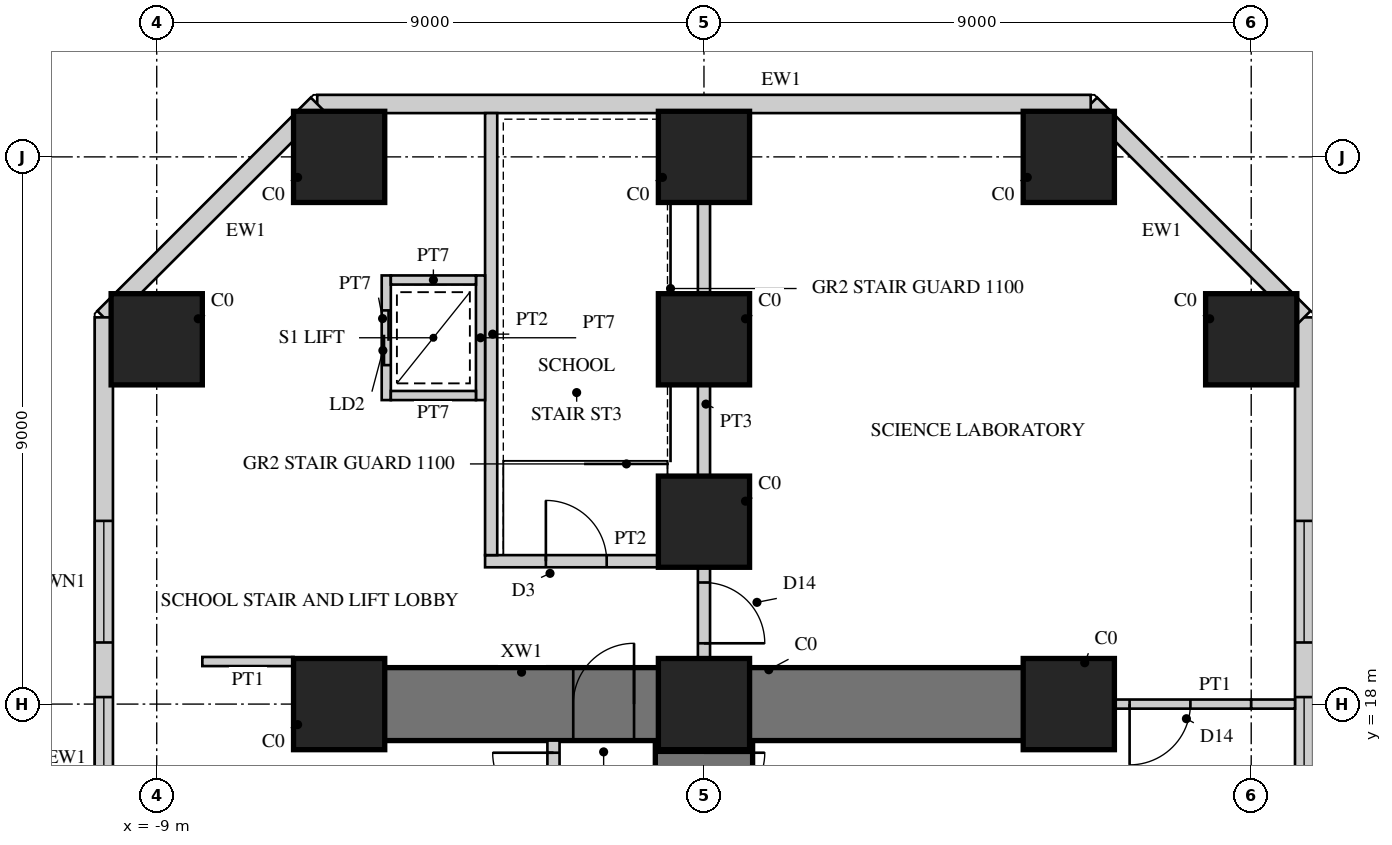
"""IFC4 building model, lengths in metres.
Left out: names, types, materials, properties, quantities, classifications, styles, units other than length and angle.
Written with IfcOpenShell. Run it as: python <this file> out.ifc"""

import sys

from ifc_helpers import new_model, si_unit, direction, frame, frame_2d, origin, origin_2d, place, context, subcontext, project, spatial, rectangle, hollow_rectangle, extrude, element, fill, save


model = new_model("IFC4")
c1 = context("Model", 3, precision=1e-05, world=origin(), true_north=direction((0.0, 1.0)))
c2 = subcontext(c1, "Body", "Model", "MODEL_VIEW")
j1 = project(units=[si_unit("LENGTHUNIT", "METRE"), si_unit("PLANEANGLEUNIT", "RADIAN")], contexts=[c1])
p1 = place(None, origin())
s1 = spatial("IfcSite", under=j1, at=p1, CompositionType="ELEMENT")
p2 = place(p1, origin())
s2 = spatial("IfcBuilding", under=s1, at=p2, CompositionType="ELEMENT")
p3 = place(p2, frame((0.0, 0.0, 14.0)))
s3 = spatial("IfcBuildingStorey", under=s2, at=p3, CompositionType="ELEMENT", Elevation=14.0)
p4 = place(p3, frame((0.0, 9.0, 0.0), z_axis=(0.0, 0.0, 1.0), x_axis=(0.0, 1.0, 0.0)))
e1 = element("IfcWall", 1, at=p4, inside=s3, PredefinedType="SHEAR", context=c2, shape_type="SweptSolid", body=[
    extrude(rectangle(XDim=9.0, YDim=1.6, at=frame_2d((4.5, 0.0))), origin(), (0.0, 0.0, 1.0), 4.5),
])
p5 = place(p4, frame((1.85, 0.0, 0.0)))
e2 = element("IfcOpeningElement", 2, at=p5, cuts=e1, PredefinedType="OPENING", context=c2, shape_type="SweptSolid", body=[
    extrude(rectangle(XDim=1.0, YDim=2.2, at=frame_2d((0.5, 1.1))), frame((0.0, 0.81, 0.0), z_axis=(0.0, -1.0, 0.0), x_axis=(1.0, 0.0, 0.0)), (0.0, 0.0, 1.0), 1.62),
])
p6 = place(p4, frame((7.2, 0.0, 0.0)))
e3 = element("IfcOpeningElement", 3, at=p6, cuts=e1, PredefinedType="OPENING", context=c2, shape_type="SweptSolid", body=[
    extrude(rectangle(XDim=1.0, YDim=2.2, at=frame_2d((0.5, 1.1))), frame((0.0, 0.81, 0.0), z_axis=(0.0, -1.0, 0.0), x_axis=(1.0, 0.0, 0.0)), (0.0, 0.0, 1.0), 1.62),
])
p7 = place(p3, frame((0.0, 18.0, 0.0), z_axis=(0.0, 0.0, 1.0), x_axis=(-1.0, 0.0, 0.0)))
e4 = element("IfcWall", 4, at=p7, inside=s3, PredefinedType="SHEAR", context=c2, shape_type="SweptSolid", body=[
    extrude(rectangle(XDim=6.0, YDim=1.2, at=frame_2d((3.0, 0.0))), origin(), (0.0, 0.0, 1.0), 4.5),
])
p8 = place(p7, frame((1.15, 0.0, 0.0)))
e5 = element("IfcOpeningElement", 5, at=p8, cuts=e4, PredefinedType="OPENING", context=c2, shape_type="SweptSolid", body=[
    extrude(rectangle(XDim=1.0, YDim=2.2, at=frame_2d((0.5, 1.1))), frame((0.0, 0.61, 0.0), z_axis=(0.0, -1.0, 0.0), x_axis=(1.0, 0.0, 0.0)), (0.0, 0.0, 1.0), 1.22),
])
p9 = place(p3, frame((0.0, 18.0, 0.0), z_axis=(0.0, 0.0, 1.0), x_axis=(1.0, 0.0, 0.0)))
e6 = element("IfcWall", 6, at=p9, inside=s3, PredefinedType="SHEAR", context=c2, shape_type="SweptSolid", body=[
    extrude(rectangle(XDim=6.0, YDim=1.2, at=frame_2d((3.0, 0.0))), origin(), (0.0, 0.0, 1.0), 4.5),
])
for number, where, z_axis, x_axis in (
    (7, (9.0, 24.0, 0.0), (0.0, 0.0, 1.0), (1.0, 0.0, 0.0)),
    (8, (-9.0, 24.0, 0.0), (0.0, 0.0, 1.0), (1.0, 0.0, 0.0)),
    (9, (6.0, 27.0, 0.0), (0.0, 0.0, 1.0), (1.0, 0.0, 0.0)),
    (10, (0.0, 27.0, 0.0), (0.0, 0.0, 1.0), (1.0, 0.0, 0.0)),
    (11, (-6.0, 27.0, 0.0), (0.0, 0.0, 1.0), (1.0, 0.0, 0.0)),
    (12, (6.0, 18.0, 0.0), (0.0, 0.0, 1.0), (1.0, 0.0, 0.0)),
    (13, (0.0, 18.0, 0.0), (0.0, 0.0, 1.0), (1.0, 0.0, 0.0)),
    (14, (-6.0, 18.0, 0.0), (0.0, 0.0, 1.0), (1.0, 0.0, 0.0)),
    (15, (0.0, 21.0, 0.0), (0.0, 0.0, 1.0), (1.0, 0.0, 0.0)),
    (16, (0.0, 24.0, 0.0), (0.0, 0.0, 1.0), (1.0, 0.0, 0.0)),
):
    element("IfcColumn", number, at=place(p3, frame(where, z_axis=z_axis, x_axis=x_axis)), inside=s3, PredefinedType="COLUMN", context=c2, shape_type="SweptSolid", body=[
        extrude(rectangle(XDim=1.5, YDim=1.5, at=origin_2d()), origin(), (0.0, 0.0, 1.0), 4.5),
    ])
p10 = place(p3, frame((9.87, 9.87, 0.0), z_axis=(0.0, 0.0, 1.0), x_axis=(0.0, 1.0, 0.0)))
e17 = element("IfcWall", 17, at=p10, inside=s3, PredefinedType="SOLIDWALL", context=c2, shape_type="SweptSolid", body=[
    extrude(rectangle(XDim=14.49, YDim=0.3, at=frame_2d((7.245, 0.0))), origin(), (0.0, 0.0, 1.0), 4.25),
])
p11 = place(p10, frame((6.245, 0.0, 0.9)))
e18 = element("IfcOpeningElement", 18, at=p11, cuts=e17, PredefinedType="OPENING", context=c2, shape_type="SweptSolid", body=[
    extrude(rectangle(XDim=2.0, YDim=1.8, at=frame_2d((1.0, 0.9))), frame((0.0, 0.16, 0.0), z_axis=(0.0, -1.0, 0.0), x_axis=(1.0, 0.0, 0.0)), (0.0, 0.0, 1.0), 0.32),
])
p12 = place(p10, frame((9.143, 0.0, 0.9)))
e19 = element("IfcOpeningElement", 19, at=p12, cuts=e17, PredefinedType="OPENING", context=c2, shape_type="SweptSolid", body=[
    extrude(rectangle(XDim=2.0, YDim=1.8, at=frame_2d((1.0, 0.9))), frame((0.0, 0.16, 0.0), z_axis=(0.0, -1.0, 0.0), x_axis=(1.0, 0.0, 0.0)), (0.0, 0.0, 1.0), 0.32),
])
p13 = place(p3, frame((9.87, 24.36, 0.0), z_axis=(0.0, 0.0, 1.0), x_axis=(-0.707106781187, 0.707106781187, 0.0)))
e20 = element("IfcWall", 20, at=p13, inside=s3, PredefinedType="SOLIDWALL", context=c2, shape_type="SweptSolid", body=[
    extrude(rectangle(XDim=4.964, YDim=0.3, at=frame_2d((2.482, 0.0))), origin(), (0.0, 0.0, 1.0), 4.25),
])
p14 = place(p3, frame((6.36, 27.87, 0.0), z_axis=(0.0, 0.0, 1.0), x_axis=(-1.0, 0.0, 0.0)))
e21 = element("IfcWall", 21, at=p14, inside=s3, PredefinedType="SOLIDWALL", context=c2, shape_type="SweptSolid", body=[
    extrude(rectangle(XDim=12.721, YDim=0.3, at=frame_2d((6.36, 0.0))), origin(), (0.0, 0.0, 1.0), 4.25),
])
p15 = place(p3, frame((-6.36, 27.87, 0.0), z_axis=(0.0, 0.0, 1.0), x_axis=(-0.707106781187, -0.707106781187, 0.0)))
e22 = element("IfcWall", 22, at=p15, inside=s3, PredefinedType="SOLIDWALL", context=c2, shape_type="SweptSolid", body=[
    extrude(rectangle(XDim=4.964, YDim=0.3, at=frame_2d((2.482, 0.0))), origin(), (0.0, 0.0, 1.0), 4.25),
])
p16 = place(p3, frame((-9.87, 24.36, 0.0), z_axis=(0.0, 0.0, 1.0), x_axis=(0.0, -1.0, 0.0)))
e23 = element("IfcWall", 23, at=p16, inside=s3, PredefinedType="SOLIDWALL", context=c2, shape_type="SweptSolid", body=[
    extrude(rectangle(XDim=14.49, YDim=0.3, at=frame_2d((7.245, 0.0))), origin(), (0.0, 0.0, 1.0), 4.25),
])
p17 = place(p16, frame((3.347, 0.0, 0.9)))
e24 = element("IfcOpeningElement", 24, at=p17, cuts=e23, PredefinedType="OPENING", context=c2, shape_type="SweptSolid", body=[
    extrude(rectangle(XDim=2.0, YDim=1.8, at=frame_2d((1.0, 0.9))), frame((0.0, 0.16, 0.0), z_axis=(0.0, -1.0, 0.0), x_axis=(1.0, 0.0, 0.0)), (0.0, 0.0, 1.0), 0.32),
])
p18 = place(p16, frame((6.245, 0.0, 0.9)))
e25 = element("IfcOpeningElement", 25, at=p18, cuts=e23, PredefinedType="OPENING", context=c2, shape_type="SweptSolid", body=[
    extrude(rectangle(XDim=2.0, YDim=1.8, at=frame_2d((1.0, 0.9))), frame((0.0, 0.16, 0.0), z_axis=(0.0, -1.0, 0.0), x_axis=(1.0, 0.0, 0.0)), (0.0, 0.0, 1.0), 0.32),
])
p19 = place(p3, frame((-2.475, 9.65, 0.0), z_axis=(0.0, 0.0, 1.0), x_axis=(0.0, 1.0, 0.0)))
e26 = element("IfcWall", 26, at=p19, inside=s3, PredefinedType="SOLIDWALL", context=c2, shape_type="SweptSolid", body=[
    extrude(rectangle(XDim=7.75, YDim=0.2, at=frame_2d((3.875, 0.0))), origin(), (0.0, 0.0, 1.0), 4.25),
])
p20 = place(p19, frame((1.2, 0.0, 0.0)))
e27 = element("IfcOpeningElement", 27, at=p20, cuts=e26, PredefinedType="OPENING", context=c2, shape_type="SweptSolid", body=[
    extrude(rectangle(XDim=1.0, YDim=2.2, at=frame_2d((0.5, 1.1))), frame((0.0, 0.11, 0.0), z_axis=(0.0, -1.0, 0.0), x_axis=(1.0, 0.0, 0.0)), (0.0, 0.0, 1.0), 0.22),
])
p21 = place(p19, frame((3.6, 0.0, 0.0)))
e28 = element("IfcOpeningElement", 28, at=p21, cuts=e26, PredefinedType="OPENING", context=c2, shape_type="SweptSolid", body=[
    extrude(rectangle(XDim=1.0, YDim=2.2, at=frame_2d((0.5, 1.1))), frame((0.0, 0.11, 0.0), z_axis=(0.0, -1.0, 0.0), x_axis=(1.0, 0.0, 0.0)), (0.0, 0.0, 1.0), 0.22),
])
p22 = place(p19, frame((6.55, 0.0, 0.0)))
e29 = element("IfcOpeningElement", 29, at=p22, cuts=e26, PredefinedType="OPENING", context=c2, shape_type="SweptSolid", body=[
    extrude(rectangle(XDim=1.0, YDim=2.2, at=frame_2d((0.5, 1.1))), frame((0.0, 0.11, 0.0), z_axis=(0.0, -1.0, 0.0), x_axis=(1.0, 0.0, 0.0)), (0.0, 0.0, 1.0), 0.22),
])
p23 = place(p3, frame((-6.75, 18.7, 0.0), z_axis=(0.0, 0.0, 1.0), x_axis=(-1.0, 0.0, 0.0)))
e30 = element("IfcWall", 30, at=p23, inside=s3, PredefinedType="PARTITIONING", context=c2, shape_type="SweptSolid", body=[
    extrude(rectangle(XDim=1.5, YDim=0.15, at=frame_2d((0.75, 0.0))), origin(), (0.0, 0.0, 1.0), 4.25),
])
p24 = place(p3, frame((-0.1, 20.35, 0.0), z_axis=(0.0, 0.0, 1.0), x_axis=(-1.0, 0.0, 0.0)))
e31 = element("IfcWall", 31, at=p24, inside=s3, PredefinedType="SOLIDWALL", context=c2, shape_type="SweptSolid", body=[
    extrude(rectangle(XDim=3.5, YDim=0.2, at=frame_2d((1.75, 0.0))), origin(), (0.0, 0.0, 1.0), 4.25),
])
p25 = place(p24, frame((1.5, 0.0, 0.0)))
e32 = element("IfcOpeningElement", 32, at=p25, cuts=e31, PredefinedType="OPENING", context=c2, shape_type="SweptSolid", body=[
    extrude(rectangle(XDim=1.0, YDim=2.1, at=frame_2d((0.5, 1.05))), frame((0.0, 0.11, 0.0), z_axis=(0.0, -1.0, 0.0), x_axis=(1.0, 0.0, 0.0)), (0.0, 0.0, 1.0), 0.22),
])
p26 = place(p3, frame((-3.5, 20.45, 0.0), z_axis=(0.0, 0.0, 1.0), x_axis=(0.0, 1.0, 0.0)))
e33 = element("IfcWall", 33, at=p26, inside=s3, PredefinedType="SOLIDWALL", context=c2, shape_type="SweptSolid", body=[
    extrude(rectangle(XDim=7.27, YDim=0.2, at=frame_2d((3.635, 0.0))), origin(), (0.0, 0.0, 1.0), 4.25),
])
p27 = place(p3, frame((-3.675, 23.0, 0.0), z_axis=(0.0, 0.0, 1.0), x_axis=(0.0, 1.0, 0.0)))
e34 = element("IfcWall", 34, at=p27, inside=s3, PredefinedType="PARTITIONING", context=c2, shape_type="SweptSolid", body=[
    extrude(rectangle(XDim=2.05, YDim=0.15, at=frame_2d((1.025, 0.0))), origin(), (0.0, 0.0, 1.0), 4.25),
])
p28 = place(p3, frame((-5.225, 23.0, 0.0), z_axis=(0.0, 0.0, 1.0), x_axis=(0.0, 1.0, 0.0)))
e35 = element("IfcWall", 35, at=p28, inside=s3, PredefinedType="PARTITIONING", context=c2, shape_type="SweptSolid", body=[
    extrude(rectangle(XDim=2.05, YDim=0.15, at=frame_2d((1.025, 0.0))), origin(), (0.0, 0.0, 1.0), 4.25),
])
p29 = place(p28, frame((0.575, 0.0, 0.0)))
e36 = element("IfcOpeningElement", 36, at=p29, cuts=e35, PredefinedType="OPENING", context=c2, shape_type="SweptSolid", body=[
    extrude(rectangle(XDim=0.9, YDim=2.1, at=frame_2d((0.45, 1.05))), frame((0.0, 0.085, 0.0), z_axis=(0.0, -1.0, 0.0), x_axis=(1.0, 0.0, 0.0)), (0.0, 0.0, 1.0), 0.17),
])
for number, where, z_axis, x_axis in (
    (37, (-3.75, 23.075, 0.0), (0.0, 0.0, 1.0), (-1.0, 0.0, 0.0)),
    (38, (-3.75, 24.975, 0.0), (0.0, 0.0, 1.0), (-1.0, 0.0, 0.0)),
):
    element("IfcWall", number, at=place(p3, frame(where, z_axis=z_axis, x_axis=x_axis)), inside=s3, PredefinedType="PARTITIONING", context=c2, shape_type="SweptSolid", body=[
        extrude(rectangle(XDim=1.4, YDim=0.15, at=frame_2d((0.7, 0.0))), origin(), (0.0, 0.0, 1.0), 4.25),
    ])
p30 = place(p3, frame((6.75, 18.0, 0.0), z_axis=(0.0, 0.0, 1.0), x_axis=(1.0, 0.0, 0.0)))
e39 = element("IfcWall", 39, at=p30, inside=s3, PredefinedType="PARTITIONING", context=c2, shape_type="SweptSolid", body=[
    extrude(rectangle(XDim=2.25, YDim=0.15, at=frame_2d((1.125, 0.0))), origin(), (0.0, 0.0, 1.0), 3.2),
])
p31 = place(p30, frame((0.25, 0.0, 0.0)))
e40 = element("IfcOpeningElement", 40, at=p31, cuts=e39, PredefinedType="OPENING", context=c2, shape_type="SweptSolid", body=[
    extrude(rectangle(XDim=1.0, YDim=2.2, at=frame_2d((0.5, 1.1))), frame((0.0, 0.085, 0.0), z_axis=(0.0, -1.0, 0.0), x_axis=(1.0, 0.0, 0.0)), (0.0, 0.0, 1.0), 0.17),
])
p32 = place(p3, frame((9.0, 18.0, 0.0), z_axis=(0.0, 0.0, 1.0), x_axis=(1.0, 0.0, 0.0)))
e41 = element("IfcWall", 41, at=p32, inside=s3, PredefinedType="PARTITIONING", context=c2, shape_type="SweptSolid", body=[
    extrude(rectangle(XDim=0.72, YDim=0.15, at=frame_2d((0.36, 0.0))), origin(), (0.0, 0.0, 1.0), 4.25),
])
p33 = place(p3, frame((0.0, 18.0, 0.0), z_axis=(0.0, 0.0, 1.0), x_axis=(0.0, 1.0, 0.0)))
e42 = element("IfcWall", 42, at=p33, inside=s3, PredefinedType="SOLIDWALL", context=c2, shape_type="SweptSolid", body=[
    extrude(rectangle(XDim=3.0, YDim=0.2, at=frame_2d((1.5, 0.0))), origin(), (0.0, 0.0, 1.0), 4.25),
])
p34 = place(p33, frame((1.0, 0.0, 0.0)))
e43 = element("IfcOpeningElement", 43, at=p34, cuts=e42, PredefinedType="OPENING", context=c2, shape_type="SweptSolid", body=[
    extrude(rectangle(XDim=1.0, YDim=2.2, at=frame_2d((0.5, 1.1))), frame((0.0, 0.11, 0.0), z_axis=(0.0, -1.0, 0.0), x_axis=(1.0, 0.0, 0.0)), (0.0, 0.0, 1.0), 0.22),
])
p35 = place(p3, frame((0.0, 21.0, 0.0), z_axis=(0.0, 0.0, 1.0), x_axis=(0.0, 1.0, 0.0)))
e44 = element("IfcWall", 44, at=p35, inside=s3, PredefinedType="SOLIDWALL", context=c2, shape_type="SweptSolid", body=[
    extrude(rectangle(XDim=6.0, YDim=0.2, at=frame_2d((3.0, 0.0))), origin(), (0.0, 0.0, 1.0), 3.15),
])
p36 = place(p11, origin())
e45 = element("IfcWindow", 45, at=p36, inside=s3, PartitioningType="SINGLE_PANEL", PredefinedType="WINDOW", context=c2, shape_type="SweptSolid", body=[
    extrude(hollow_rectangle(XDim=2.0, YDim=1.8, WallThickness=0.06, at=frame_2d((1.0, 0.9))), frame((0.0, 0.03, 0.0), z_axis=(0.0, -1.0, 0.0), x_axis=(1.0, 0.0, 0.0)), (0.0, 0.0, 1.0), 0.06),
    extrude(rectangle(XDim=1.879, YDim=1.679, at=frame_2d((1.0, 0.9))), frame((0.0, 0.03, 0.0), z_axis=(0.0, -1.0, 0.0), x_axis=(1.0, 0.0, 0.0)), (0.0, 0.0, 1.0), 0.06),
])
fill(e18, e45)
p37 = place(p12, origin())
e46 = element("IfcWindow", 46, at=p37, inside=s3, PartitioningType="SINGLE_PANEL", PredefinedType="WINDOW", context=c2, shape_type="SweptSolid", body=[
    extrude(hollow_rectangle(XDim=2.0, YDim=1.8, WallThickness=0.06, at=frame_2d((1.0, 0.9))), frame((0.0, 0.03, 0.0), z_axis=(0.0, -1.0, 0.0), x_axis=(1.0, 0.0, 0.0)), (0.0, 0.0, 1.0), 0.06),
    extrude(rectangle(XDim=1.879, YDim=1.679, at=frame_2d((1.0, 0.9))), frame((0.0, 0.03, 0.0), z_axis=(0.0, -1.0, 0.0), x_axis=(1.0, 0.0, 0.0)), (0.0, 0.0, 1.0), 0.06),
])
fill(e19, e46)
p38 = place(p17, origin())
e47 = element("IfcWindow", 47, at=p38, inside=s3, PartitioningType="SINGLE_PANEL", PredefinedType="WINDOW", context=c2, shape_type="SweptSolid", body=[
    extrude(hollow_rectangle(XDim=2.0, YDim=1.8, WallThickness=0.06, at=frame_2d((1.0, 0.9))), frame((0.0, 0.03, 0.0), z_axis=(0.0, -1.0, 0.0), x_axis=(1.0, 0.0, 0.0)), (0.0, 0.0, 1.0), 0.06),
    extrude(rectangle(XDim=1.879, YDim=1.679, at=frame_2d((1.0, 0.9))), frame((0.0, 0.03, 0.0), z_axis=(0.0, -1.0, 0.0), x_axis=(1.0, 0.0, 0.0)), (0.0, 0.0, 1.0), 0.06),
])
fill(e24, e47)
p39 = place(p18, origin())
e48 = element("IfcWindow", 48, at=p39, inside=s3, PartitioningType="SINGLE_PANEL", PredefinedType="WINDOW", context=c2, shape_type="SweptSolid", body=[
    extrude(hollow_rectangle(XDim=2.0, YDim=1.8, WallThickness=0.06, at=frame_2d((1.0, 0.9))), frame((0.0, 0.03, 0.0), z_axis=(0.0, -1.0, 0.0), x_axis=(1.0, 0.0, 0.0)), (0.0, 0.0, 1.0), 0.06),
    extrude(rectangle(XDim=1.879, YDim=1.679, at=frame_2d((1.0, 0.9))), frame((0.0, 0.03, 0.0), z_axis=(0.0, -1.0, 0.0), x_axis=(1.0, 0.0, 0.0)), (0.0, 0.0, 1.0), 0.06),
])
fill(e25, e48)
p40 = place(p22, origin())
e49 = element("IfcDoor", 49, at=p40, inside=s3, OperationType="SINGLE_SWING_RIGHT", PredefinedType="DOOR", context=c2, shape_type="SweptSolid", body=[
    extrude(rectangle(XDim=1.0, YDim=2.2, at=frame_2d((0.5, 1.1))), frame((0.0, 0.025, 0.0), z_axis=(0.0, -1.0, 0.0), x_axis=(1.0, 0.0, 0.0)), (0.0, 0.0, 1.0), 0.05),
])
fill(e29, e49)
p41 = place(p25, frame((1.0, 0.0, 0.0), z_axis=(0.0, 0.0, 1.0), x_axis=(-1.0, 0.0, 0.0)))
e50 = element("IfcDoor", 50, at=p41, inside=s3, OperationType="SINGLE_SWING_LEFT", PredefinedType="DOOR", context=c2, shape_type="SweptSolid", body=[
    extrude(rectangle(XDim=1.0, YDim=2.1, at=frame_2d((0.5, 1.05))), frame((0.0, 0.025, 0.0), z_axis=(0.0, -1.0, 0.0), x_axis=(1.0, 0.0, 0.0)), (0.0, 0.0, 1.0), 0.05),
])
fill(e32, e50)
p42 = place(p29, origin())
e51 = element("IfcDoor", 51, at=p42, inside=s3, OperationType="DOUBLE_DOOR_SLIDING", PredefinedType="DOOR", context=c2, shape_type="SweptSolid", body=[
    extrude(rectangle(XDim=0.9, YDim=2.1, at=frame_2d((0.45, 1.05))), frame((0.0, 0.025, 0.0), z_axis=(0.0, -1.0, 0.0), x_axis=(1.0, 0.0, 0.0)), (0.0, 0.0, 1.0), 0.05),
])
fill(e36, e51)
p43 = place(p31, frame((1.0, 0.0, 0.0), z_axis=(0.0, 0.0, 1.0), x_axis=(-1.0, 0.0, 0.0)))
e52 = element("IfcDoor", 52, at=p43, inside=s3, OperationType="SINGLE_SWING_RIGHT", PredefinedType="DOOR", context=c2, shape_type="SweptSolid", body=[
    extrude(rectangle(XDim=1.0, YDim=2.2, at=frame_2d((0.5, 1.1))), frame((0.0, 0.025, 0.0), z_axis=(0.0, -1.0, 0.0), x_axis=(1.0, 0.0, 0.0)), (0.0, 0.0, 1.0), 0.05),
])
fill(e40, e52)
p44 = place(p6, frame((1.0, 0.0, 0.0), z_axis=(0.0, 0.0, 1.0), x_axis=(-1.0, 0.0, 0.0)))
e53 = element("IfcDoor", 53, at=p44, inside=s3, OperationType="SINGLE_SWING_LEFT", PredefinedType="DOOR", context=c2, shape_type="SweptSolid", body=[
    extrude(rectangle(XDim=1.0, YDim=2.2, at=frame_2d((0.5, 1.1))), frame((0.0, 0.025, 0.0), z_axis=(0.0, -1.0, 0.0), x_axis=(1.0, 0.0, 0.0)), (0.0, 0.0, 1.0), 0.05),
])
fill(e3, e53)
p45 = place(p34, frame((1.0, 0.0, 0.0), z_axis=(0.0, 0.0, 1.0), x_axis=(-1.0, 0.0, 0.0)))
e54 = element("IfcDoor", 54, at=p45, inside=s3, OperationType="SINGLE_SWING_RIGHT", PredefinedType="DOOR", context=c2, shape_type="SweptSolid", body=[
    extrude(rectangle(XDim=1.0, YDim=2.2, at=frame_2d((0.5, 1.1))), frame((0.0, 0.025, 0.0), z_axis=(0.0, -1.0, 0.0), x_axis=(1.0, 0.0, 0.0)), (0.0, 0.0, 1.0), 0.05),
])
fill(e43, e54)
p46 = place(p8, frame((1.0, 0.0, 0.0), z_axis=(0.0, 0.0, 1.0), x_axis=(-1.0, 0.0, 0.0)))
e55 = element("IfcDoor", 55, at=p46, inside=s3, OperationType="SINGLE_SWING_RIGHT", PredefinedType="DOOR", context=c2, shape_type="SweptSolid", body=[
    extrude(rectangle(XDim=1.0, YDim=2.2, at=frame_2d((0.5, 1.1))), frame((0.0, 0.025, 0.0), z_axis=(0.0, -1.0, 0.0), x_axis=(1.0, 0.0, 0.0)), (0.0, 0.0, 1.0), 0.05),
])
fill(e5, e55)
save(model, sys.argv[1])
